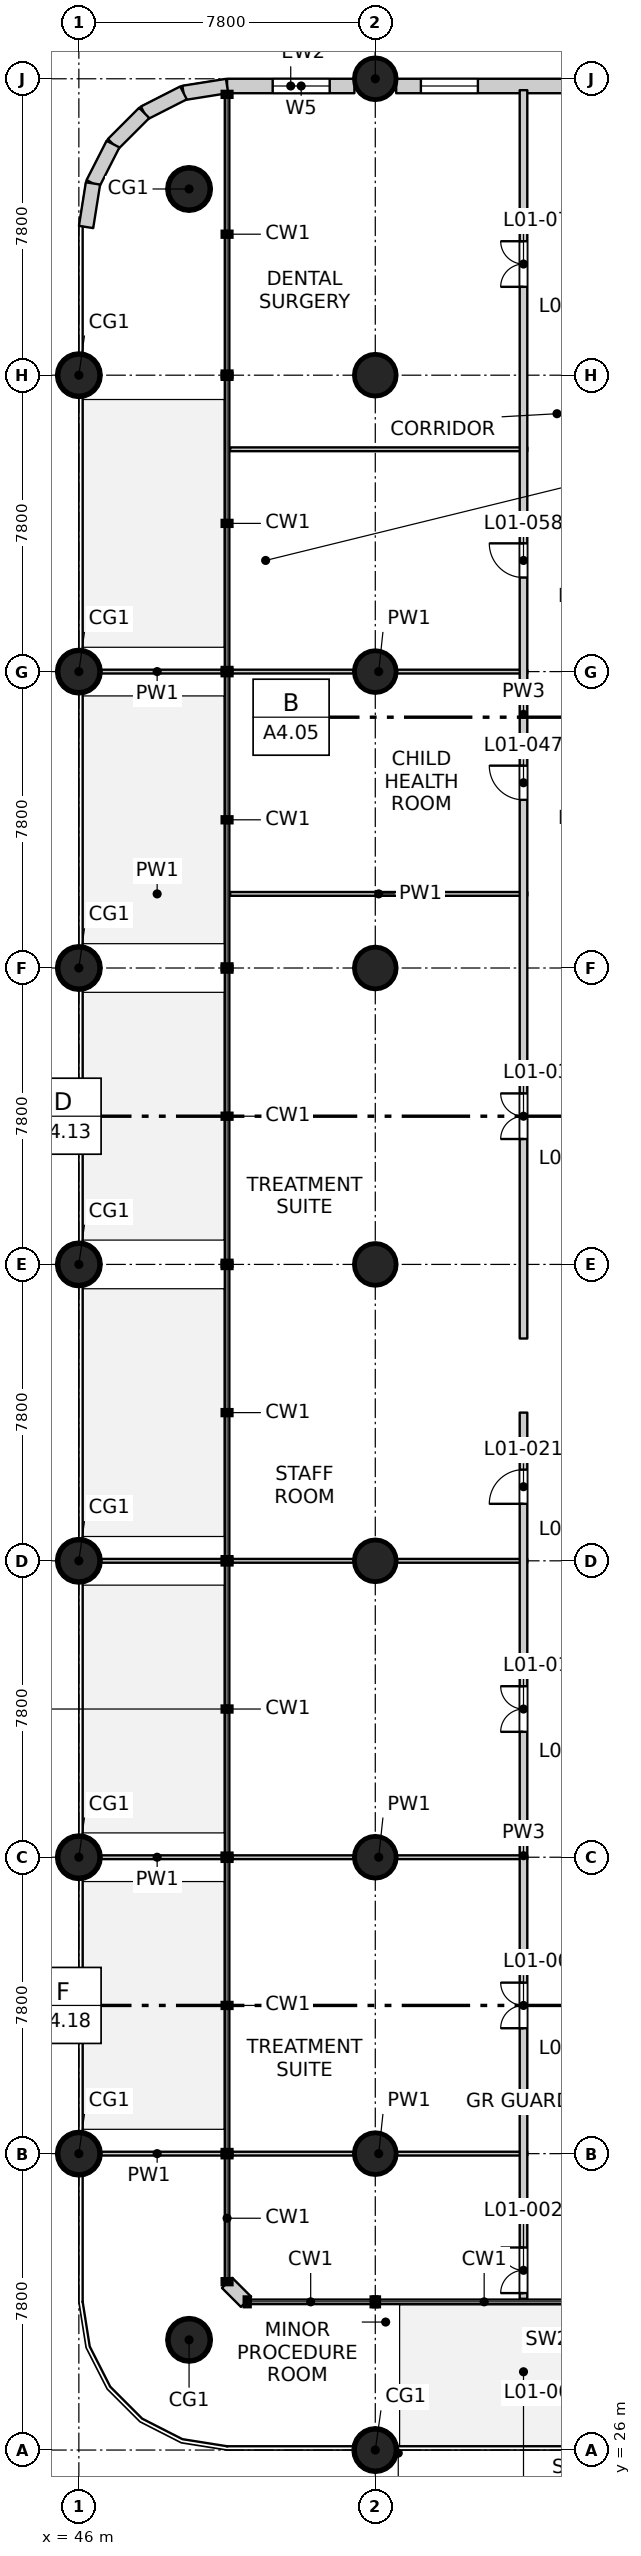
"""IFC4 building model, lengths in metres.
Left out: names, types, materials, properties, quantities, classifications, styles, units other than length and angle.
Written with IfcOpenShell. Run it as: python <this file> out.ifc"""

import sys

from ifc_helpers import new_model, si_unit, direction, frame, frame_2d, origin, origin_2d, place, context, subcontext, project, spatial, rectangle, circle, extrude, element, fill, save


model = new_model("IFC4")
c1 = context("Model", 3, precision=1e-05, world=origin(), true_north=direction((0.0, 1.0)))
c2 = subcontext(c1, "Body", "Model", "MODEL_VIEW")
j1 = project(units=[si_unit("LENGTHUNIT", "METRE"), si_unit("PLANEANGLEUNIT", "RADIAN")], contexts=[c1])
p1 = place(None, origin())
s1 = spatial("IfcSite", under=j1, at=p1, CompositionType="ELEMENT")
p2 = place(p1, origin())
s2 = spatial("IfcBuilding", under=s1, at=p2, CompositionType="ELEMENT")
p3 = place(p2, frame((0.0, 0.0, 6.0)))
s3 = spatial("IfcBuildingStorey", under=s2, at=p3, CompositionType="ELEMENT", Elevation=6.0)
for number, where, z_axis, x_axis in (
    (1, (48.9, 28.9, -0.3), (0.0, 0.0, 1.0), (1.0, 0.0, 0.0)),
    (2, (46.0, 33.8, -0.3), (0.0, 0.0, 1.0), (1.0, 0.0, 0.0)),
    (3, (46.0, 41.6, -0.3), (0.0, 0.0, 1.0), (1.0, 0.0, 0.0)),
    (4, (46.0, 49.4, -0.3), (0.0, 0.0, 1.0), (1.0, 0.0, 0.0)),
    (5, (46.0, 57.2, -0.3), (0.0, 0.0, 1.0), (1.0, 0.0, 0.0)),
    (6, (46.0, 65.0, -0.3), (0.0, 0.0, 1.0), (1.0, 0.0, 0.0)),
    (7, (46.0, 72.8, -0.3), (0.0, 0.0, 1.0), (1.0, 0.0, 0.0)),
    (8, (46.0, 80.6, -0.3), (0.0, 0.0, 1.0), (1.0, 0.0, 0.0)),
    (9, (48.9, 85.5, -0.3), (0.0, 0.0, 1.0), (1.0, 0.0, 0.0)),
    (10, (53.8, 26.0, -0.3), (0.0, 0.0, 1.0), (1.0, 0.0, 0.0)),
    (11, (53.8, 33.8, -0.3), (0.0, 0.0, 1.0), (1.0, 0.0, 0.0)),
    (12, (53.8, 41.6, -0.3), (0.0, 0.0, 1.0), (1.0, 0.0, 0.0)),
    (13, (53.8, 49.4, -0.3), (0.0, 0.0, 1.0), (1.0, 0.0, 0.0)),
    (14, (53.8, 57.2, -0.3), (0.0, 0.0, 1.0), (1.0, 0.0, 0.0)),
    (15, (53.8, 65.0, -0.3), (0.0, 0.0, 1.0), (1.0, 0.0, 0.0)),
    (16, (53.8, 72.8, -0.3), (0.0, 0.0, 1.0), (1.0, 0.0, 0.0)),
    (17, (53.8, 80.6, -0.3), (0.0, 0.0, 1.0), (1.0, 0.0, 0.0)),
    (18, (53.8, 88.4, -0.3), (0.0, 0.0, 1.0), (1.0, 0.0, 0.0)),
):
    element("IfcColumn", number, at=place(p3, frame(where, z_axis=z_axis, x_axis=x_axis)), inside=s3, PredefinedType="COLUMN", context=c2, shape_type="SweptSolid", body=[
        extrude(circle(Radius=0.55, at=origin_2d()), origin(), (0.0, 0.0, 1.0), 4.5),
    ])
p4 = place(p3, frame((50.4, 29.9, 0.0), z_axis=(0.0, 0.0, 1.0), x_axis=(-0.707106781187, 0.707106781187, 0.0)))
e19 = element("IfcWall", 19, at=p4, inside=s3, PredefinedType="SOLIDWALL", context=c2, shape_type="SweptSolid", body=[
    extrude(rectangle(XDim=0.707, YDim=0.38, at=frame_2d((0.354, 0.0))), origin(), (0.0, 0.0, 1.0), 4.2),
])
p5 = place(p3, frame((49.9, 88.21, 0.0), z_axis=(0.0, 0.0, 1.0), x_axis=(1.0, 0.0, 0.0)))
e20 = element("IfcWall", 20, at=p5, inside=s3, PredefinedType="SOLIDWALL", context=c2, shape_type="SweptSolid", body=[
    extrude(rectangle(XDim=3.35, YDim=0.38, at=frame_2d((1.675, 0.0))), origin(), (0.0, 0.0, 1.0), 4.2),
])
p6 = place(p5, frame((1.2, 0.0, 0.9)))
e21 = element("IfcOpeningElement", 21, at=p6, cuts=e20, PredefinedType="OPENING", context=c2, shape_type="SweptSolid", body=[
    extrude(rectangle(XDim=1.5, YDim=1.5, at=frame_2d((0.75, 0.75))), frame((0.0, 0.2, 0.0), z_axis=(0.0, -1.0, 0.0), x_axis=(1.0, 0.0, 0.0)), (0.0, 0.0, 1.0), 0.4),
])
p7 = place(p3, frame((54.35, 88.21, 0.0), z_axis=(0.0, 0.0, 1.0), x_axis=(1.0, 0.0, 0.0)))
e22 = element("IfcWall", 22, at=p7, inside=s3, PredefinedType="SOLIDWALL", context=c2, shape_type="SweptSolid", body=[
    extrude(rectangle(XDim=14.45, YDim=0.38, at=frame_2d((7.225, 0.0))), origin(), (0.0, 0.0, 1.0), 4.2),
])
p8 = place(p7, frame((0.65, 0.0, 0.9)))
e23 = element("IfcOpeningElement", 23, at=p8, cuts=e22, PredefinedType="OPENING", context=c2, shape_type="SweptSolid", body=[
    extrude(rectangle(XDim=1.5, YDim=1.5, at=frame_2d((0.75, 0.75))), frame((0.0, 0.2, 0.0), z_axis=(0.0, -1.0, 0.0), x_axis=(1.0, 0.0, 0.0)), (0.0, 0.0, 1.0), 0.4),
])
p9 = place(p7, frame((8.45, 0.0, 0.9)))
e24 = element("IfcOpeningElement", 24, at=p9, cuts=e22, PredefinedType="OPENING", context=c2, shape_type="SweptSolid", body=[
    extrude(rectangle(XDim=1.5, YDim=1.5, at=frame_2d((0.75, 0.75))), frame((0.0, 0.2, 0.0), z_axis=(0.0, -1.0, 0.0), x_axis=(1.0, 0.0, 0.0)), (0.0, 0.0, 1.0), 0.4),
])
p10 = place(p7, frame((12.35, 0.0, 0.9)))
e25 = element("IfcOpeningElement", 25, at=p10, cuts=e22, PredefinedType="OPENING", context=c2, shape_type="SweptSolid", body=[
    extrude(rectangle(XDim=1.5, YDim=1.5, at=frame_2d((0.75, 0.75))), frame((0.0, 0.2, 0.0), z_axis=(0.0, -1.0, 0.0), x_axis=(1.0, 0.0, 0.0)), (0.0, 0.0, 1.0), 0.4),
])
p11 = place(p3, frame((49.9, 88.21, 0.0), z_axis=(0.0, 0.0, 1.0), x_axis=(-0.987675821844, -0.156513484867, 0.0)))
e26 = element("IfcWall", 26, at=p11, inside=s3, PredefinedType="SOLIDWALL", context=c2, shape_type="SweptSolid", body=[
    extrude(rectangle(XDim=1.161, YDim=0.38, at=frame_2d((0.58, 0.0))), origin(), (0.0, 0.0, 1.0), 4.2),
])
for number, where, z_axis, x_axis in (
    (27, (48.754, 88.028, 0.0), (0.0, 0.0, 1.0), (-0.891, -0.454, 0.0)),
    (28, (47.719, 87.501, 0.0), (0.0, 0.0, 1.0), (-0.707, -0.707, 0.0)),
):
    element("IfcWall", number, at=place(p3, frame(where, z_axis=z_axis, x_axis=x_axis)), inside=s3, PredefinedType="SOLIDWALL", context=c2, shape_type="SweptSolid", body=[
        extrude(rectangle(XDim=1.161, YDim=0.38, at=frame_2d((0.581, 0.0))), origin(), (0.0, 0.0, 1.0), 4.2),
    ])
p12 = place(p3, frame((46.898, 86.681, 0.0), z_axis=(0.0, 0.0, 1.0), x_axis=(-0.453932083539, -0.891036286317, 0.0)))
e29 = element("IfcWall", 29, at=p12, inside=s3, PredefinedType="SOLIDWALL", context=c2, shape_type="SweptSolid", body=[
    extrude(rectangle(XDim=1.161, YDim=0.38, at=frame_2d((0.58, 0.0))), origin(), (0.0, 0.0, 1.0), 4.2),
])
p13 = place(p3, frame((46.372, 85.646, 0.0), z_axis=(0.0, 0.0, 1.0), x_axis=(-0.156480971952, -0.987680973502, 0.0)))
e30 = element("IfcWall", 30, at=p13, inside=s3, PredefinedType="SOLIDWALL", context=c2, shape_type="SweptSolid", body=[
    extrude(rectangle(XDim=1.161, YDim=0.38, at=frame_2d((0.581, 0.0))), origin(), (0.0, 0.0, 1.0), 4.2),
])
p14 = place(p3, frame((46.3, 33.8, 0.0), z_axis=(0.0, 0.0, 1.0), x_axis=(1.0, 0.0, 0.0)))
e31 = element("IfcWall", 31, at=p14, inside=s3, PredefinedType="PARTITIONING", context=c2, shape_type="SweptSolid", body=[
    extrude(rectangle(XDim=3.52, YDim=0.1, at=frame_2d((1.76, 0.0))), origin(), (0.0, 0.0, 1.0), 4.2),
])
p15 = place(p3, frame((49.98, 33.8, 0.0), z_axis=(0.0, 0.0, 1.0), x_axis=(1.0, 0.0, 0.0)))
e32 = element("IfcWall", 32, at=p15, inside=s3, PredefinedType="PARTITIONING", context=c2, shape_type="SweptSolid", body=[
    extrude(rectangle(XDim=7.82, YDim=0.1, at=frame_2d((3.91, 0.0))), origin(), (0.0, 0.0, 1.0), 4.2),
])
p16 = place(p3, frame((46.3, 41.6, 0.0), z_axis=(0.0, 0.0, 1.0), x_axis=(1.0, 0.0, 0.0)))
e33 = element("IfcWall", 33, at=p16, inside=s3, PredefinedType="PARTITIONING", context=c2, shape_type="SweptSolid", body=[
    extrude(rectangle(XDim=3.52, YDim=0.1, at=frame_2d((1.76, 0.0))), origin(), (0.0, 0.0, 1.0), 4.2),
])
p17 = place(p3, frame((49.98, 41.6, 0.0), z_axis=(0.0, 0.0, 1.0), x_axis=(1.0, 0.0, 0.0)))
e34 = element("IfcWall", 34, at=p17, inside=s3, PredefinedType="PARTITIONING", context=c2, shape_type="SweptSolid", body=[
    extrude(rectangle(XDim=7.82, YDim=0.1, at=frame_2d((3.91, 0.0))), origin(), (0.0, 0.0, 1.0), 4.2),
])
p18 = place(p3, frame((46.3, 49.4, 0.0), z_axis=(0.0, 0.0, 1.0), x_axis=(1.0, 0.0, 0.0)))
e35 = element("IfcWall", 35, at=p18, inside=s3, PredefinedType="PARTITIONING", context=c2, shape_type="SweptSolid", body=[
    extrude(rectangle(XDim=3.52, YDim=0.1, at=frame_2d((1.76, 0.0))), origin(), (0.0, 0.0, 1.0), 4.2),
])
p19 = place(p3, frame((49.98, 49.4, 0.0), z_axis=(0.0, 0.0, 1.0), x_axis=(1.0, 0.0, 0.0)))
e36 = element("IfcWall", 36, at=p19, inside=s3, PredefinedType="PARTITIONING", context=c2, shape_type="SweptSolid", body=[
    extrude(rectangle(XDim=7.82, YDim=0.1, at=frame_2d((3.91, 0.0))), origin(), (0.0, 0.0, 1.0), 4.2),
])
p20 = place(p3, frame((46.3, 66.95, 0.0), z_axis=(0.0, 0.0, 1.0), x_axis=(1.0, 0.0, 0.0)))
e37 = element("IfcWall", 37, at=p20, inside=s3, PredefinedType="PARTITIONING", context=c2, shape_type="SweptSolid", body=[
    extrude(rectangle(XDim=3.52, YDim=0.1, at=frame_2d((1.76, 0.0))), origin(), (0.0, 0.0, 1.0), 4.2),
])
p21 = place(p3, frame((49.98, 66.95, 0.0), z_axis=(0.0, 0.0, 1.0), x_axis=(1.0, 0.0, 0.0)))
e38 = element("IfcWall", 38, at=p21, inside=s3, PredefinedType="PARTITIONING", context=c2, shape_type="SweptSolid", body=[
    extrude(rectangle(XDim=7.82, YDim=0.1, at=frame_2d((3.91, 0.0))), origin(), (0.0, 0.0, 1.0), 4.2),
])
p22 = place(p3, frame((46.3, 72.8, 0.0), z_axis=(0.0, 0.0, 1.0), x_axis=(1.0, 0.0, 0.0)))
e39 = element("IfcWall", 39, at=p22, inside=s3, PredefinedType="PARTITIONING", context=c2, shape_type="SweptSolid", body=[
    extrude(rectangle(XDim=3.52, YDim=0.1, at=frame_2d((1.76, 0.0))), origin(), (0.0, 0.0, 1.0), 4.2),
])
p23 = place(p3, frame((49.98, 72.8, 0.0), z_axis=(0.0, 0.0, 1.0), x_axis=(1.0, 0.0, 0.0)))
e40 = element("IfcWall", 40, at=p23, inside=s3, PredefinedType="PARTITIONING", context=c2, shape_type="SweptSolid", body=[
    extrude(rectangle(XDim=7.82, YDim=0.1, at=frame_2d((3.91, 0.0))), origin(), (0.0, 0.0, 1.0), 4.2),
])
p24 = place(p3, frame((46.3, 78.65, 0.0), z_axis=(0.0, 0.0, 1.0), x_axis=(1.0, 0.0, 0.0)))
e41 = element("IfcWall", 41, at=p24, inside=s3, PredefinedType="PARTITIONING", context=c2, shape_type="SweptSolid", body=[
    extrude(rectangle(XDim=3.52, YDim=0.1, at=frame_2d((1.76, 0.0))), origin(), (0.0, 0.0, 1.0), 4.2),
])
p25 = place(p3, frame((49.98, 78.65, 0.0), z_axis=(0.0, 0.0, 1.0), x_axis=(1.0, 0.0, 0.0)))
e42 = element("IfcWall", 42, at=p25, inside=s3, PredefinedType="PARTITIONING", context=c2, shape_type="SweptSolid", body=[
    extrude(rectangle(XDim=7.82, YDim=0.1, at=frame_2d((3.91, 0.0))), origin(), (0.0, 0.0, 1.0), 4.2),
])
p26 = place(p3, frame((57.7, 26.3, 0.0), z_axis=(0.0, 0.0, 1.0), x_axis=(0.0, 1.0, 0.0)))
e43 = element("IfcWall", 43, at=p26, inside=s3, PredefinedType="PARTITIONING", context=c2, shape_type="SweptSolid", body=[
    extrude(rectangle(XDim=3.52, YDim=0.2, at=frame_2d((1.76, 0.0))), origin(), (0.0, 0.0, 1.0), 4.2),
])
p27 = place(p3, frame((57.7, 29.98, 0.0), z_axis=(0.0, 0.0, 1.0), x_axis=(0.0, 1.0, 0.0)))
e44 = element("IfcWall", 44, at=p27, inside=s3, PredefinedType="PARTITIONING", context=c2, shape_type="SweptSolid", body=[
    extrude(rectangle(XDim=23.32, YDim=0.2, at=frame_2d((11.66, 0.0))), origin(), (0.0, 0.0, 1.0), 4.2),
])
p28 = place(p27, frame((0.15, 0.0, 0.0)))
e45 = element("IfcOpeningElement", 45, at=p28, cuts=e44, PredefinedType="OPENING", context=c2, shape_type="SweptSolid", body=[
    extrude(rectangle(XDim=1.2, YDim=2.1, at=frame_2d((0.6, 1.05))), frame((0.0, 0.11, 0.0), z_axis=(0.0, -1.0, 0.0), x_axis=(1.0, 0.0, 0.0)), (0.0, 0.0, 1.0), 0.22),
])
p29 = place(p27, frame((7.12, 0.0, 0.0)))
e46 = element("IfcOpeningElement", 46, at=p29, cuts=e44, PredefinedType="OPENING", context=c2, shape_type="SweptSolid", body=[
    extrude(rectangle(XDim=1.2, YDim=2.1, at=frame_2d((0.6, 1.05))), frame((0.0, 0.11, 0.0), z_axis=(0.0, -1.0, 0.0), x_axis=(1.0, 0.0, 0.0)), (0.0, 0.0, 1.0), 0.22),
])
p30 = place(p27, frame((14.92, 0.0, 0.0)))
e47 = element("IfcOpeningElement", 47, at=p30, cuts=e44, PredefinedType="OPENING", context=c2, shape_type="SweptSolid", body=[
    extrude(rectangle(XDim=1.2, YDim=2.1, at=frame_2d((0.6, 1.05))), frame((0.0, 0.11, 0.0), z_axis=(0.0, -1.0, 0.0), x_axis=(1.0, 0.0, 0.0)), (0.0, 0.0, 1.0), 0.22),
])
p31 = place(p27, frame((20.92, 0.0, 0.0)))
e48 = element("IfcOpeningElement", 48, at=p31, cuts=e44, PredefinedType="OPENING", context=c2, shape_type="SweptSolid", body=[
    extrude(rectangle(XDim=0.9, YDim=2.1, at=frame_2d((0.45, 1.05))), frame((0.0, 0.11, 0.0), z_axis=(0.0, -1.0, 0.0), x_axis=(1.0, 0.0, 0.0)), (0.0, 0.0, 1.0), 0.22),
])
p32 = place(p3, frame((57.7, 55.25, 0.0), z_axis=(0.0, 0.0, 1.0), x_axis=(0.0, 1.0, 0.0)))
e49 = element("IfcWall", 49, at=p32, inside=s3, PredefinedType="PARTITIONING", context=c2, shape_type="SweptSolid", body=[
    extrude(rectangle(XDim=32.85, YDim=0.2, at=frame_2d((16.425, 0.0))), origin(), (0.0, 0.0, 1.0), 4.2),
])
p33 = place(p32, frame((5.25, 0.0, 0.0)))
e50 = element("IfcOpeningElement", 50, at=p33, cuts=e49, PredefinedType="OPENING", context=c2, shape_type="SweptSolid", body=[
    extrude(rectangle(XDim=1.2, YDim=2.1, at=frame_2d((0.6, 1.05))), frame((0.0, 0.11, 0.0), z_axis=(0.0, -1.0, 0.0), x_axis=(1.0, 0.0, 0.0)), (0.0, 0.0, 1.0), 0.22),
])
p34 = place(p32, frame((14.175, 0.0, 0.0)))
e51 = element("IfcOpeningElement", 51, at=p34, cuts=e49, PredefinedType="OPENING", context=c2, shape_type="SweptSolid", body=[
    extrude(rectangle(XDim=0.9, YDim=2.1, at=frame_2d((0.45, 1.05))), frame((0.0, 0.11, 0.0), z_axis=(0.0, -1.0, 0.0), x_axis=(1.0, 0.0, 0.0)), (0.0, 0.0, 1.0), 0.22),
])
p35 = place(p32, frame((20.025, 0.0, 0.0)))
e52 = element("IfcOpeningElement", 52, at=p35, cuts=e49, PredefinedType="OPENING", context=c2, shape_type="SweptSolid", body=[
    extrude(rectangle(XDim=0.9, YDim=2.1, at=frame_2d((0.45, 1.05))), frame((0.0, 0.11, 0.0), z_axis=(0.0, -1.0, 0.0), x_axis=(1.0, 0.0, 0.0)), (0.0, 0.0, 1.0), 0.22),
])
p36 = place(p32, frame((27.675, 0.0, 0.0)))
e53 = element("IfcOpeningElement", 53, at=p36, cuts=e49, PredefinedType="OPENING", context=c2, shape_type="SweptSolid", body=[
    extrude(rectangle(XDim=1.2, YDim=2.1, at=frame_2d((0.6, 1.05))), frame((0.0, 0.11, 0.0), z_axis=(0.0, -1.0, 0.0), x_axis=(1.0, 0.0, 0.0)), (0.0, 0.0, 1.0), 0.22),
])
p37 = place(p6, origin())
e54 = element("IfcWindow", 54, at=p37, inside=s3, PartitioningType="SINGLE_PANEL", PredefinedType="WINDOW", context=c2, shape_type="SweptSolid", body=[
    extrude(rectangle(XDim=1.5, YDim=1.5, at=frame_2d((0.75, 0.75))), frame((0.0, 0.03, 0.0), z_axis=(0.0, -1.0, 0.0), x_axis=(1.0, 0.0, 0.0)), (0.0, 0.0, 1.0), 0.06),
])
fill(e21, e54)
p38 = place(p8, origin())
e55 = element("IfcWindow", 55, at=p38, inside=s3, PartitioningType="SINGLE_PANEL", PredefinedType="WINDOW", context=c2, shape_type="SweptSolid", body=[
    extrude(rectangle(XDim=1.5, YDim=1.5, at=frame_2d((0.75, 0.75))), frame((0.0, 0.03, 0.0), z_axis=(0.0, -1.0, 0.0), x_axis=(1.0, 0.0, 0.0)), (0.0, 0.0, 1.0), 0.06),
])
fill(e23, e55)
p39 = place(p28, origin())
e56 = element("IfcDoor", 56, at=p39, inside=s3, OperationType="DOUBLE_DOOR_SINGLE_SWING", PredefinedType="DOOR", context=c2, shape_type="SweptSolid", body=[
    extrude(rectangle(XDim=1.2, YDim=2.1, at=frame_2d((0.6, 1.05))), frame((0.0, 0.025, 0.0), z_axis=(0.0, -1.0, 0.0), x_axis=(1.0, 0.0, 0.0)), (0.0, 0.0, 1.0), 0.05),
])
fill(e45, e56)
p40 = place(p29, origin())
e57 = element("IfcDoor", 57, at=p40, inside=s3, OperationType="DOUBLE_DOOR_SINGLE_SWING", PredefinedType="DOOR", context=c2, shape_type="SweptSolid", body=[
    extrude(rectangle(XDim=1.2, YDim=2.1, at=frame_2d((0.6, 1.05))), frame((0.0, 0.025, 0.0), z_axis=(0.0, -1.0, 0.0), x_axis=(1.0, 0.0, 0.0)), (0.0, 0.0, 1.0), 0.05),
])
fill(e46, e57)
p41 = place(p30, origin())
e58 = element("IfcDoor", 58, at=p41, inside=s3, OperationType="DOUBLE_DOOR_SINGLE_SWING", PredefinedType="DOOR", context=c2, shape_type="SweptSolid", body=[
    extrude(rectangle(XDim=1.2, YDim=2.1, at=frame_2d((0.6, 1.05))), frame((0.0, 0.025, 0.0), z_axis=(0.0, -1.0, 0.0), x_axis=(1.0, 0.0, 0.0)), (0.0, 0.0, 1.0), 0.05),
])
fill(e47, e58)
p42 = place(p31, origin())
e59 = element("IfcDoor", 59, at=p42, inside=s3, OperationType="SINGLE_SWING_LEFT", PredefinedType="DOOR", context=c2, shape_type="SweptSolid", body=[
    extrude(rectangle(XDim=0.9, YDim=2.1, at=frame_2d((0.45, 1.05))), frame((0.0, 0.025, 0.0), z_axis=(0.0, -1.0, 0.0), x_axis=(1.0, 0.0, 0.0)), (0.0, 0.0, 1.0), 0.05),
])
fill(e48, e59)
p43 = place(p33, origin())
e60 = element("IfcDoor", 60, at=p43, inside=s3, OperationType="DOUBLE_DOOR_SINGLE_SWING", PredefinedType="DOOR", context=c2, shape_type="SweptSolid", body=[
    extrude(rectangle(XDim=1.2, YDim=2.1, at=frame_2d((0.6, 1.05))), frame((0.0, 0.025, 0.0), z_axis=(0.0, -1.0, 0.0), x_axis=(1.0, 0.0, 0.0)), (0.0, 0.0, 1.0), 0.05),
])
fill(e50, e60)
p44 = place(p34, origin())
e61 = element("IfcDoor", 61, at=p44, inside=s3, OperationType="SINGLE_SWING_RIGHT", PredefinedType="DOOR", context=c2, shape_type="SweptSolid", body=[
    extrude(rectangle(XDim=0.9, YDim=2.1, at=frame_2d((0.45, 1.05))), frame((0.0, 0.025, 0.0), z_axis=(0.0, -1.0, 0.0), x_axis=(1.0, 0.0, 0.0)), (0.0, 0.0, 1.0), 0.05),
])
fill(e51, e61)
p45 = place(p35, origin())
e62 = element("IfcDoor", 62, at=p45, inside=s3, OperationType="SINGLE_SWING_RIGHT", PredefinedType="DOOR", context=c2, shape_type="SweptSolid", body=[
    extrude(rectangle(XDim=0.9, YDim=2.1, at=frame_2d((0.45, 1.05))), frame((0.0, 0.025, 0.0), z_axis=(0.0, -1.0, 0.0), x_axis=(1.0, 0.0, 0.0)), (0.0, 0.0, 1.0), 0.05),
])
fill(e52, e62)
p46 = place(p36, origin())
e63 = element("IfcDoor", 63, at=p46, inside=s3, OperationType="DOUBLE_DOOR_SINGLE_SWING", PredefinedType="DOOR", context=c2, shape_type="SweptSolid", body=[
    extrude(rectangle(XDim=1.2, YDim=2.1, at=frame_2d((0.6, 1.05))), frame((0.0, 0.025, 0.0), z_axis=(0.0, -1.0, 0.0), x_axis=(1.0, 0.0, 0.0)), (0.0, 0.0, 1.0), 0.05),
])
fill(e53, e63)
save(model, sys.argv[1])
